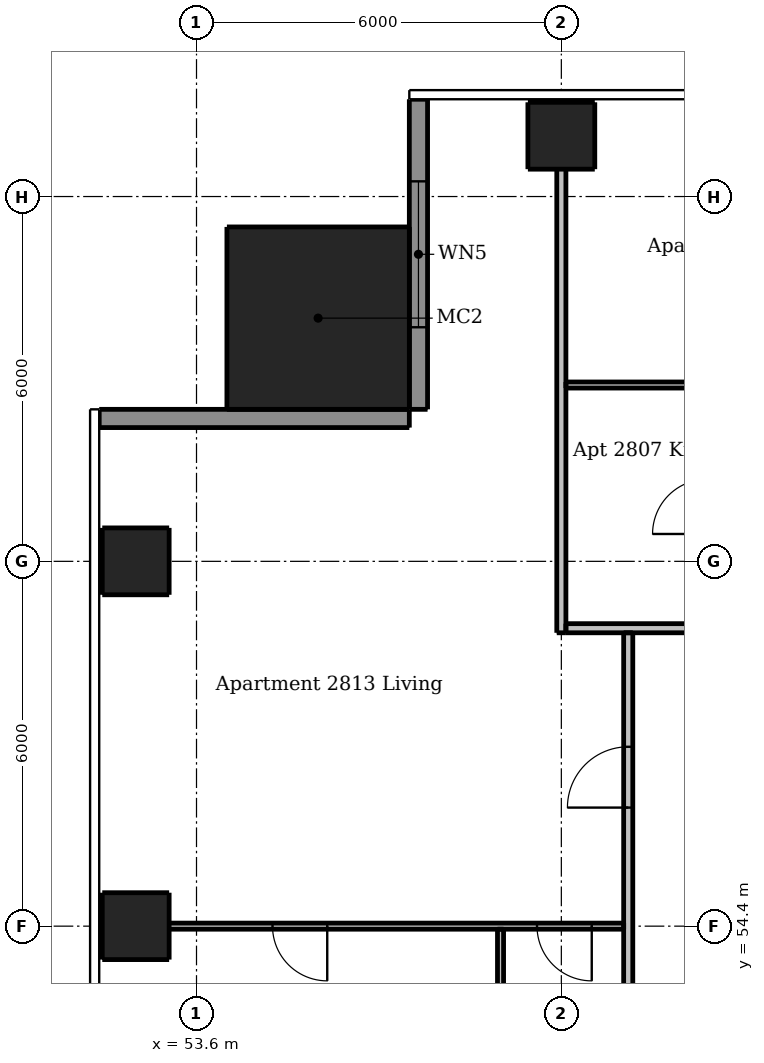
"""IFC4 building model, lengths in metres.
Left out: names, types, materials, properties, quantities, classifications, styles, units other than length and angle.
Written with IfcOpenShell. Run it as: python <this file> out.ifc"""

import sys

from ifc_helpers import new_model, si_unit, direction, frame, frame_2d, origin, origin_2d, place, context, subcontext, project, spatial, rectangle, extrude, element, fill, save


model = new_model("IFC4")
c1 = context("Model", 3, precision=1e-05, world=origin(), true_north=direction((0.0, 1.0)))
c2 = subcontext(c1, "Body", "Model", "MODEL_VIEW")
j1 = project(units=[si_unit("LENGTHUNIT", "METRE"), si_unit("PLANEANGLEUNIT", "RADIAN")], contexts=[c1])
p1 = place(None, origin())
s1 = spatial("IfcSite", under=j1, at=p1, CompositionType="ELEMENT")
p2 = place(p1, origin())
s2 = spatial("IfcBuilding", under=s1, at=p2, CompositionType="ELEMENT")
p3 = place(p2, frame((0.0, 0.0, 105.1)))
s3 = spatial("IfcBuildingStorey", under=s2, at=p3, CompositionType="ELEMENT", Elevation=105.1)
for number, where, z_axis, x_axis in (
    (1, (59.6, 67.4, 0.0), (0.0, 0.0, 1.0), (1.0, 0.0, 0.0)),
    (2, (52.6, 54.4, 0.0), (0.0, 0.0, 1.0), (1.0, 0.0, 0.0)),
    (3, (52.6, 60.4, 0.0), (0.0, 0.0, 1.0), (1.0, 0.0, 0.0)),
):
    element("IfcColumn", number, at=place(p3, frame(where, z_axis=z_axis, x_axis=x_axis)), inside=s3, PredefinedType="COLUMN", context=c2, shape_type="SweptSolid", body=[
        extrude(rectangle(XDim=1.1, YDim=1.1, at=origin_2d()), origin(), (0.0, 0.0, 1.0), 3.05),
    ])
p4 = place(p3, frame((55.6, 64.4, 0.0), z_axis=(0.0, 0.0, 1.0), x_axis=(1.0, 0.0, 0.0)))
e4 = element("IfcColumn", 4, at=p4, inside=s3, PredefinedType="COLUMN", context=c2, shape_type="SweptSolid", body=[
    extrude(rectangle(XDim=3.0, YDim=3.0, at=origin_2d()), origin(), (0.0, 0.0, 1.0), 3.3),
])
p5 = place(p3, frame((57.25, 68.0, 0.0), z_axis=(0.0, 0.0, 1.0), x_axis=(0.0, -1.0, 0.0)))
e5 = element("IfcWall", 5, at=p5, inside=s3, PredefinedType="SOLIDWALL", context=c2, shape_type="SweptSolid", body=[
    extrude(rectangle(XDim=5.1, YDim=0.3, at=frame_2d((2.55, 0.0))), origin(), (0.0, 0.0, 1.0), 3.05),
])
p6 = place(p5, frame((1.35, 0.0, 0.15)))
e6 = element("IfcOpeningElement", 6, at=p6, cuts=e5, PredefinedType="OPENING", context=c2, shape_type="SweptSolid", body=[
    extrude(rectangle(XDim=2.4, YDim=2.1, at=frame_2d((1.2, 1.05))), frame((0.0, 0.16, 0.0), z_axis=(0.0, -1.0, 0.0), x_axis=(1.0, 0.0, 0.0)), (0.0, 0.0, 1.0), 0.32),
])
p7 = place(p3, frame((57.1, 62.75, 0.0), z_axis=(0.0, 0.0, 1.0), x_axis=(-1.0, 0.0, 0.0)))
e7 = element("IfcWall", 7, at=p7, inside=s3, PredefinedType="SOLIDWALL", context=c2, shape_type="SweptSolid", body=[
    extrude(rectangle(XDim=5.1, YDim=0.3, at=frame_2d((2.55, 0.0))), origin(), (0.0, 0.0, 1.0), 3.05),
])
p8 = place(p3, frame((58.6, 54.35, 0.0), z_axis=(0.0, 0.0, 1.0), x_axis=(0.0, -1.0, 0.0)))
e8 = element("IfcWall", 8, at=p8, inside=s3, PredefinedType="PARTITIONING", context=c2, shape_type="SweptSolid", body=[
    extrude(rectangle(XDim=5.875, YDim=0.1, at=frame_2d((2.938, 0.0))), origin(), (0.0, 0.0, 1.0), 3.05),
])
p9 = place(p8, frame((3.75, 0.0, 0.0)))
e9 = element("IfcOpeningElement", 9, at=p9, cuts=e8, PredefinedType="OPENING", context=c2, shape_type="SweptSolid", body=[
    extrude(rectangle(XDim=0.8, YDim=2.1, at=frame_2d((0.4, 1.05))), frame((0.0, 0.06, 0.0), z_axis=(0.0, -1.0, 0.0), x_axis=(1.0, 0.0, 0.0)), (0.0, 0.0, 1.0), 0.12),
])
p10 = place(p3, frame((59.675, 63.3, 0.0), z_axis=(0.0, 0.0, 1.0), x_axis=(1.0, 0.0, 0.0)))
e10 = element("IfcWall", 10, at=p10, inside=s3, PredefinedType="PARTITIONING", context=c2, shape_type="SweptSolid", body=[
    extrude(rectangle(XDim=2.275, YDim=0.1, at=frame_2d((1.137, 0.0))), origin(), (0.0, 0.0, 1.0), 3.05),
])
p11 = place(p3, frame((60.625, 54.4, 0.0), z_axis=(0.0, 0.0, 1.0), x_axis=(-1.0, 0.0, 0.0)))
e11 = element("IfcWall", 11, at=p11, inside=s3, PredefinedType="PARTITIONING", context=c2, shape_type="SweptSolid", body=[
    extrude(rectangle(XDim=8.625, YDim=0.1, at=frame_2d((4.312, 0.0))), origin(), (0.0, 0.0, 1.0), 2.516),
])
p12 = place(p11, frame((0.525, 0.0, 0.0)))
e12 = element("IfcOpeningElement", 12, at=p12, cuts=e11, PredefinedType="OPENING", context=c2, shape_type="SweptSolid", body=[
    extrude(rectangle(XDim=0.9, YDim=2.1, at=frame_2d((0.45, 1.05))), frame((0.0, 0.06, 0.0), z_axis=(0.0, -1.0, 0.0), x_axis=(1.0, 0.0, 0.0)), (0.0, 0.0, 1.0), 0.12),
])
p13 = place(p11, frame((4.875, 0.0, 0.0)))
e13 = element("IfcOpeningElement", 13, at=p13, cuts=e11, PredefinedType="OPENING", context=c2, shape_type="SweptSolid", body=[
    extrude(rectangle(XDim=0.9, YDim=2.1, at=frame_2d((0.45, 1.05))), frame((0.0, 0.06, 0.0), z_axis=(0.0, -1.0, 0.0), x_axis=(1.0, 0.0, 0.0)), (0.0, 0.0, 1.0), 0.12),
])
p14 = place(p3, frame((59.6, 59.225, 0.0), z_axis=(0.0, 0.0, 1.0), x_axis=(0.0, 1.0, 0.0)))
e14 = element("IfcWall", 14, at=p14, inside=s3, PredefinedType="PARTITIONING", context=c2, shape_type="SweptSolid", body=[
    extrude(rectangle(XDim=8.775, YDim=0.15, at=frame_2d((4.387, 0.0))), origin(), (0.0, 0.0, 1.0), 2.51),
])
p15 = place(p3, frame((60.7, 30.325, 0.0), z_axis=(0.0, 0.0, 1.0), x_axis=(0.0, 1.0, 0.0)))
e15 = element("IfcWall", 15, at=p15, inside=s3, PredefinedType="PARTITIONING", context=c2, shape_type="SweptSolid", body=[
    extrude(rectangle(XDim=28.9, YDim=0.15, at=frame_2d((14.45, 0.0))), origin(), (0.0, 0.0, 1.0), 3.05),
])
p16 = place(p15, frame((2.575, 0.0, 0.0)))
e16 = element("IfcOpeningElement", 16, at=p16, cuts=e15, PredefinedType="OPENING", context=c2, shape_type="SweptSolid", body=[
    extrude(rectangle(XDim=1.0, YDim=2.1, at=frame_2d((0.5, 1.05))), frame((0.0, 0.085, 0.0), z_axis=(0.0, -1.0, 0.0), x_axis=(1.0, 0.0, 0.0)), (0.0, 0.0, 1.0), 0.17),
])
p17 = place(p15, frame((8.575, 0.0, 0.0)))
e17 = element("IfcOpeningElement", 17, at=p17, cuts=e15, PredefinedType="OPENING", context=c2, shape_type="SweptSolid", body=[
    extrude(rectangle(XDim=1.0, YDim=2.1, at=frame_2d((0.5, 1.05))), frame((0.0, 0.085, 0.0), z_axis=(0.0, -1.0, 0.0), x_axis=(1.0, 0.0, 0.0)), (0.0, 0.0, 1.0), 0.17),
])
p18 = place(p15, frame((14.575, 0.0, 0.0)))
e18 = element("IfcOpeningElement", 18, at=p18, cuts=e15, PredefinedType="OPENING", context=c2, shape_type="SweptSolid", body=[
    extrude(rectangle(XDim=1.0, YDim=2.1, at=frame_2d((0.5, 1.05))), frame((0.0, 0.085, 0.0), z_axis=(0.0, -1.0, 0.0), x_axis=(1.0, 0.0, 0.0)), (0.0, 0.0, 1.0), 0.17),
])
p19 = place(p15, frame((26.025, 0.0, 0.0)))
e19 = element("IfcOpeningElement", 19, at=p19, cuts=e15, PredefinedType="OPENING", context=c2, shape_type="SweptSolid", body=[
    extrude(rectangle(XDim=1.0, YDim=2.1, at=frame_2d((0.5, 1.05))), frame((0.0, 0.085, 0.0), z_axis=(0.0, -1.0, 0.0), x_axis=(1.0, 0.0, 0.0)), (0.0, 0.0, 1.0), 0.17),
])
p20 = place(p3, frame((59.675, 59.3, 0.0), z_axis=(0.0, 0.0, 1.0), x_axis=(1.0, 0.0, 0.0)))
e20 = element("IfcWall", 20, at=p20, inside=s3, PredefinedType="PARTITIONING", context=c2, shape_type="SweptSolid", body=[
    extrude(rectangle(XDim=28.55, YDim=0.15, at=frame_2d((14.275, 0.0))), origin(), (0.0, 0.0, 1.0), 3.05),
])
p21 = place(p20, frame((3.625, 0.0, 0.0)))
e21 = element("IfcOpeningElement", 21, at=p21, cuts=e20, PredefinedType="OPENING", context=c2, shape_type="SweptSolid", body=[
    extrude(rectangle(XDim=1.0, YDim=2.1, at=frame_2d((0.5, 1.05))), frame((0.0, 0.085, 0.0), z_axis=(0.0, -1.0, 0.0), x_axis=(1.0, 0.0, 0.0)), (0.0, 0.0, 1.0), 0.17),
])
p22 = place(p20, frame((14.425, 0.0, 0.0)))
e22 = element("IfcOpeningElement", 22, at=p22, cuts=e20, PredefinedType="OPENING", context=c2, shape_type="SweptSolid", body=[
    extrude(rectangle(XDim=1.0, YDim=2.1, at=frame_2d((0.5, 1.05))), frame((0.0, 0.085, 0.0), z_axis=(0.0, -1.0, 0.0), x_axis=(1.0, 0.0, 0.0)), (0.0, 0.0, 1.0), 0.17),
])
p23 = place(p20, frame((25.775, 0.0, 0.0)))
e23 = element("IfcOpeningElement", 23, at=p23, cuts=e20, PredefinedType="OPENING", context=c2, shape_type="SweptSolid", body=[
    extrude(rectangle(XDim=1.0, YDim=2.1, at=frame_2d((0.5, 1.05))), frame((0.0, 0.085, 0.0), z_axis=(0.0, -1.0, 0.0), x_axis=(1.0, 0.0, 0.0)), (0.0, 0.0, 1.0), 0.17),
])
p24 = place(p6, origin())
e24 = element("IfcWindow", 24, at=p24, inside=s3, PartitioningType="DOUBLE_PANEL_VERTICAL", PredefinedType="WINDOW", context=c2, shape_type="SweptSolid", body=[
    extrude(rectangle(XDim=2.4, YDim=2.1, at=frame_2d((1.2, 1.05))), frame((0.0, 0.03, 0.0), z_axis=(0.0, -1.0, 0.0), x_axis=(1.0, 0.0, 0.0)), (0.0, 0.0, 1.0), 0.06),
])
fill(e6, e24)
p25 = place(p19, origin())
e25 = element("IfcDoor", 25, at=p25, inside=s3, OperationType="SINGLE_SWING_LEFT", PredefinedType="DOOR", context=c2, shape_type="SweptSolid", body=[
    extrude(rectangle(XDim=1.0, YDim=2.1, at=frame_2d((0.5, 1.05))), frame((0.0, 0.025, 0.0), z_axis=(0.0, -1.0, 0.0), x_axis=(1.0, 0.0, 0.0)), (0.0, 0.0, 1.0), 0.05),
])
fill(e19, e25)
p26 = place(p12, origin())
e26 = element("IfcDoor", 26, at=p26, inside=s3, OperationType="SINGLE_SWING_LEFT", PredefinedType="DOOR", context=c2, shape_type="SweptSolid", body=[
    extrude(rectangle(XDim=0.9, YDim=2.1, at=frame_2d((0.45, 1.05))), frame((0.0, 0.025, 0.0), z_axis=(0.0, -1.0, 0.0), x_axis=(1.0, 0.0, 0.0)), (0.0, 0.0, 1.0), 0.05),
])
fill(e12, e26)
p27 = place(p13, origin())
e27 = element("IfcDoor", 27, at=p27, inside=s3, OperationType="SINGLE_SWING_LEFT", PredefinedType="DOOR", context=c2, shape_type="SweptSolid", body=[
    extrude(rectangle(XDim=0.9, YDim=2.1, at=frame_2d((0.45, 1.05))), frame((0.0, 0.025, 0.0), z_axis=(0.0, -1.0, 0.0), x_axis=(1.0, 0.0, 0.0)), (0.0, 0.0, 1.0), 0.05),
])
fill(e13, e27)
save(model, sys.argv[1])
